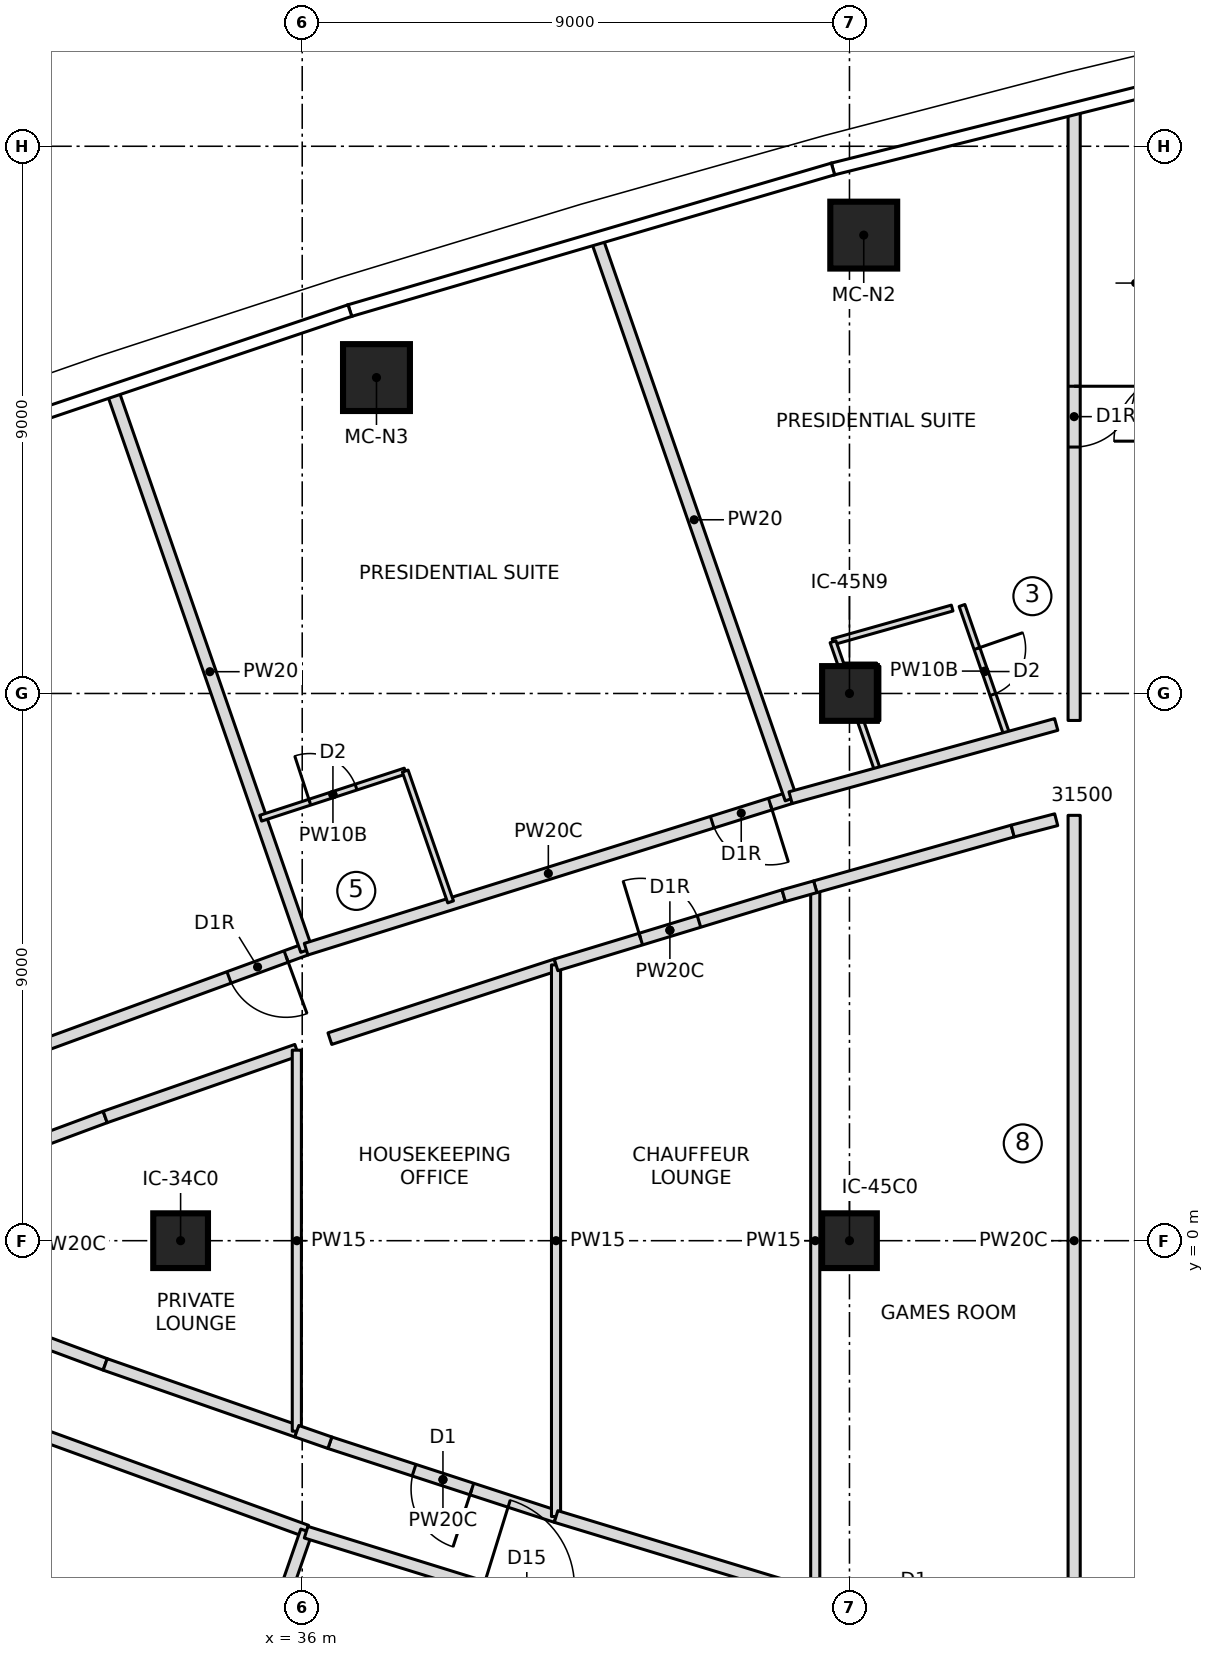
"""IFC4 building model, lengths in metres.
Left out: names, types, materials, properties, quantities, classifications, styles, units other than length and angle.
Written with IfcOpenShell. Run it as: python <this file> out.ifc"""

import sys

from ifc_helpers import new_model, si_unit, direction, frame, frame_2d, origin, origin_2d, place, context, subcontext, project, spatial, rectangle, extrude, element, fill, save


model = new_model("IFC4")
c1 = context("Model", 3, precision=1e-05, world=origin(), true_north=direction((0.0, 1.0)))
c2 = subcontext(c1, "Body", "Model", "MODEL_VIEW")
j1 = project(units=[si_unit("LENGTHUNIT", "METRE"), si_unit("PLANEANGLEUNIT", "RADIAN")], contexts=[c1])
p1 = place(None, origin())
s1 = spatial("IfcSite", under=j1, at=p1, CompositionType="ELEMENT")
p2 = place(p1, origin())
s2 = spatial("IfcBuilding", under=s1, at=p2, CompositionType="ELEMENT")
p3 = place(p2, frame((0.0, 0.0, 292.75)))
s3 = spatial("IfcBuildingStorey", under=s2, at=p3, CompositionType="ELEMENT", Elevation=292.75)
for number, where, z_axis, x_axis in (
    (1, (45.235, 16.539, 0.0), (0.0, 0.0, 1.0), (1.0, 0.0, 0.0)),
    (2, (37.221, 14.196, 0.0), (0.0, 0.0, 1.0), (1.0, 0.0, 0.0)),
):
    element("IfcColumn", number, at=place(p3, frame(where, z_axis=z_axis, x_axis=x_axis)), inside=s3, PredefinedType="COLUMN", context=c2, shape_type="SweptSolid", body=[
        extrude(rectangle(XDim=1.1, YDim=1.1, at=origin_2d()), origin(), (0.0, 0.0, 1.0), 3.55),
    ])
for number, where, z_axis, x_axis in (
    (3, (34.0, 0.0, 0.0), (0.0, 0.0, 1.0), (1.0, 0.0, 0.0)),
    (4, (45.0, 0.0, 0.0), (0.0, 0.0, 1.0), (1.0, 0.0, 0.0)),
    (5, (45.0, 9.0, 0.0), (0.0, 0.0, 1.0), (1.0, 0.0, 0.0)),
):
    element("IfcColumn", number, at=place(p3, frame(where, z_axis=z_axis, x_axis=x_axis)), inside=s3, PredefinedType="COLUMN", context=c2, shape_type="SweptSolid", body=[
        extrude(rectangle(XDim=0.9, YDim=0.9, at=origin_2d()), origin(), (0.0, 0.0, 1.0), 3.55),
    ])
p4 = place(p3, frame((36.064, 4.794, 0.0), z_axis=(0.0, 0.0, 1.0), x_axis=(-0.93911227702, -0.34361043516, 0.0)))
e6 = element("IfcWall", 6, at=p4, inside=s3, PredefinedType="PARTITIONING", context=c2, shape_type="SweptSolid", body=[
    extrude(rectangle(XDim=9.812, YDim=0.2, at=frame_2d((4.906, 0.0))), origin(), (0.0, 0.0, 1.0), 3.25),
])
p5 = place(p4, frame((0.35, 0.0, 0.0)))
e7 = element("IfcOpeningElement", 7, at=p5, cuts=e6, PredefinedType="OPENING", context=c2, shape_type="SweptSolid", body=[
    extrude(rectangle(XDim=1.0, YDim=2.1, at=frame_2d((0.5, 1.05))), frame((0.0, 0.11, 0.0), z_axis=(0.0, -1.0, 0.0), x_axis=(1.0, 0.0, 0.0)), (0.0, 0.0, 1.0), 0.22),
])
p6 = place(p3, frame((36.071, 4.775, 0.0), z_axis=(0.0, 0.0, 1.0), x_axis=(-0.327725028322, 0.94477315045, 0.0)))
e8 = element("IfcWall", 8, at=p6, inside=s3, PredefinedType="PARTITIONING", context=c2, shape_type="SweptSolid", body=[
    extrude(rectangle(XDim=9.702, YDim=0.2, at=frame_2d((4.851, 0.0))), origin(), (0.0, 0.0, 1.0), 3.25),
])
p7 = place(p3, frame((44.031, 7.286, 0.0), z_axis=(0.0, 0.0, 1.0), x_axis=(-0.95441177989, -0.29849313963, 0.0)))
e9 = element("IfcWall", 9, at=p7, inside=s3, PredefinedType="PARTITIONING", context=c2, shape_type="SweptSolid", body=[
    extrude(rectangle(XDim=8.348, YDim=0.2, at=frame_2d((4.174, 0.0))), origin(), (0.0, 0.0, 1.0), 3.25),
])
p8 = place(p7, frame((0.35, 0.0, 0.0)))
e10 = element("IfcOpeningElement", 10, at=p8, cuts=e9, PredefinedType="OPENING", context=c2, shape_type="SweptSolid", body=[
    extrude(rectangle(XDim=1.0, YDim=2.1, at=frame_2d((0.5, 1.05))), frame((0.0, 0.11, 0.0), z_axis=(0.0, -1.0, 0.0), x_axis=(1.0, 0.0, 0.0)), (0.0, 0.0, 1.0), 0.22),
])
p9 = place(p3, frame((35.317, 6.948, 0.0), z_axis=(0.0, 0.0, 1.0), x_axis=(0.950666002187, 0.310216299194, 0.0)))
e11 = element("IfcWall", 11, at=p9, inside=s3, PredefinedType="PARTITIONING", context=c2, shape_type="SweptSolid", body=[
    extrude(rectangle(XDim=2.5, YDim=0.1, at=frame_2d((1.25, 0.0))), origin(), (0.0, 0.0, 1.0), 3.25),
])
p10 = place(p9, frame((0.85, 0.0, 0.0)))
e12 = element("IfcOpeningElement", 12, at=p10, cuts=e11, PredefinedType="OPENING", context=c2, shape_type="SweptSolid", body=[
    extrude(rectangle(XDim=0.8, YDim=2.1, at=frame_2d((0.4, 1.05))), frame((0.0, 0.06, 0.0), z_axis=(0.0, -1.0, 0.0), x_axis=(1.0, 0.0, 0.0)), (0.0, 0.0, 1.0), 0.12),
])
p11 = place(p3, frame((37.694, 7.724, 0.0), z_axis=(0.0, 0.0, 1.0), x_axis=(0.327622330203, -0.944808768351, 0.0)))
e13 = element("IfcWall", 13, at=p11, inside=s3, PredefinedType="PARTITIONING", context=c2, shape_type="SweptSolid", body=[
    extrude(rectangle(XDim=2.277, YDim=0.1, at=frame_2d((1.139, 0.0))), origin(), (0.0, 0.0, 1.0), 3.25),
])
p12 = place(p3, frame((44.038, 7.267, 0.0), z_axis=(0.0, 0.0, 1.0), x_axis=(-0.327714576096, 0.944776776077, 0.0)))
e14 = element("IfcWall", 14, at=p12, inside=s3, PredefinedType="PARTITIONING", context=c2, shape_type="SweptSolid", body=[
    extrude(rectangle(XDim=9.717, YDim=0.2, at=frame_2d((4.858, 0.0))), origin(), (0.0, 0.0, 1.0), 3.25),
])
p13 = place(p3, frame((44.729, 9.852, 0.0), z_axis=(0.0, 0.0, 1.0), x_axis=(0.962405498185, 0.271616746654, 0.0)))
e15 = element("IfcWall", 15, at=p13, inside=s3, PredefinedType="PARTITIONING", context=c2, shape_type="SweptSolid", body=[
    extrude(rectangle(XDim=2.037, YDim=0.1, at=frame_2d((1.019, 0.0))), origin(), (0.0, 0.0, 1.0), 3.25),
])
p14 = place(p3, frame((46.851, 10.447, 0.0), z_axis=(0.0, 0.0, 1.0), x_axis=(0.327716238033, -0.944776199599, 0.0)))
e16 = element("IfcWall", 16, at=p14, inside=s3, PredefinedType="PARTITIONING", context=c2, shape_type="SweptSolid", body=[
    extrude(rectangle(XDim=2.284, YDim=0.1, at=frame_2d((1.142, 0.0))), origin(), (0.0, 0.0, 1.0), 3.25),
])
p15 = place(p14, frame((0.75, 0.0, 0.0)))
e17 = element("IfcOpeningElement", 17, at=p15, cuts=e16, PredefinedType="OPENING", context=c2, shape_type="SweptSolid", body=[
    extrude(rectangle(XDim=0.8, YDim=2.1, at=frame_2d((0.4, 1.05))), frame((0.0, 0.06, 0.0), z_axis=(0.0, -1.0, 0.0), x_axis=(1.0, 0.0, 0.0)), (0.0, 0.0, 1.0), 0.12),
])
p16 = place(p3, frame((45.476, 7.697, 0.0), z_axis=(0.0, 0.0, 1.0), x_axis=(-0.327723446833, 0.944773699039, 0.0)))
e18 = element("IfcWall", 18, at=p16, inside=s3, PredefinedType="PARTITIONING", context=c2, shape_type="SweptSolid", body=[
    extrude(rectangle(XDim=0.903, YDim=0.1, at=frame_2d((0.451, 0.0))), origin(), (0.0, 0.0, 1.0), 3.25),
])
p17 = place(p3, frame((45.45, 8.552, 0.0), z_axis=(0.0, 0.0, 1.0), x_axis=(0.0, 1.0, 0.0)))
e19 = element("IfcWall", 19, at=p17, inside=s3, PredefinedType="PARTITIONING", context=c2, shape_type="SweptSolid", body=[
    extrude(rectangle(XDim=0.896, YDim=0.1, at=frame_2d((0.448, 0.0))), origin(), (0.0, 0.0, 1.0), 3.25),
])
p18 = place(p3, frame((45.448, 9.45, 0.0), z_axis=(0.0, 0.0, 1.0), x_axis=(-1.0, 0.0, 0.0)))
e20 = element("IfcWall", 20, at=p18, inside=s3, PredefinedType="PARTITIONING", context=c2, shape_type="SweptSolid", body=[
    extrude(rectangle(XDim=0.58, YDim=0.1, at=frame_2d((0.29, 0.0))), origin(), (0.0, 0.0, 1.0), 3.25),
])
p19 = place(p3, frame((44.868, 9.45, 0.0), z_axis=(0.0, 0.0, 1.0), x_axis=(-0.327741335839, 0.944767493504, 0.0)))
e21 = element("IfcWall", 21, at=p19, inside=s3, PredefinedType="PARTITIONING", context=c2, shape_type="SweptSolid", body=[
    extrude(rectangle(XDim=0.425, YDim=0.1, at=frame_2d((0.213, 0.0))), origin(), (0.0, 0.0, 1.0), 3.25),
])
p20 = place(p3, frame((26.85, -1.423, 0.0), z_axis=(0.0, 0.0, 1.0), x_axis=(0.939807953272, -0.341703103536, 0.0)))
e22 = element("IfcWall", 22, at=p20, inside=s3, PredefinedType="PARTITIONING", context=c2, shape_type="SweptSolid", body=[
    extrude(rectangle(XDim=9.811, YDim=0.2, at=frame_2d((4.906, 0.0))), origin(), (0.0, 0.0, 1.0), 3.25),
])
p21 = place(p20, frame((3.05, 0.0, 0.0)))
e23 = element("IfcOpeningElement", 23, at=p21, cuts=e22, PredefinedType="OPENING", context=c2, shape_type="SweptSolid", body=[
    extrude(rectangle(XDim=1.5, YDim=2.1, at=frame_2d((0.75, 1.05))), frame((0.0, 0.11, 0.0), z_axis=(0.0, -1.0, 0.0), x_axis=(1.0, 0.0, 0.0)), (0.0, 0.0, 1.0), 0.22),
])
p22 = place(p3, frame((32.891, -13.941, 0.0), z_axis=(0.0, 0.0, 1.0), x_axis=(0.327725028322, 0.94477315045, 0.0)))
e24 = element("IfcWall", 24, at=p22, inside=s3, PredefinedType="PARTITIONING", context=c2, shape_type="SweptSolid", body=[
    extrude(rectangle(XDim=9.702, YDim=0.2, at=frame_2d((4.851, 0.0))), origin(), (0.0, 0.0, 1.0), 3.25),
])
p23 = place(p3, frame((36.064, -4.794, 0.0), z_axis=(0.0, 0.0, 1.0), x_axis=(0.955129200503, -0.296189483855, 0.0)))
e25 = element("IfcWall", 25, at=p23, inside=s3, PredefinedType="PARTITIONING", context=c2, shape_type="SweptSolid", body=[
    extrude(rectangle(XDim=8.348, YDim=0.2, at=frame_2d((4.174, 0.0))), origin(), (0.0, 0.0, 1.0), 3.25),
])
p24 = place(p23, frame((3.05, 0.0, 0.0)))
e26 = element("IfcOpeningElement", 26, at=p24, cuts=e25, PredefinedType="OPENING", context=c2, shape_type="SweptSolid", body=[
    extrude(rectangle(XDim=1.5, YDim=2.1, at=frame_2d((0.75, 1.05))), frame((0.0, 0.11, 0.0), z_axis=(0.0, -1.0, 0.0), x_axis=(1.0, 0.0, 0.0)), (0.0, 0.0, 1.0), 0.22),
])
p25 = place(p3, frame((32.76, -2.035, 0.0), z_axis=(0.0, 0.0, 1.0), x_axis=(-0.937460178932, 0.348092534992, 0.0)))
e27 = element("IfcWall", 27, at=p25, inside=s3, PredefinedType="PARTITIONING", context=c2, shape_type="SweptSolid", body=[
    extrude(rectangle(XDim=3.913, YDim=0.2, at=frame_2d((1.957, 0.0))), origin(), (0.0, 0.0, 1.0), 3.25),
])
p26 = place(p25, frame((1.457, 0.0, 0.0)))
e28 = element("IfcOpeningElement", 28, at=p26, cuts=e27, PredefinedType="OPENING", context=c2, shape_type="SweptSolid", body=[
    extrude(rectangle(XDim=1.0, YDim=2.1, at=frame_2d((0.5, 1.05))), frame((0.0, 0.11, 0.0), z_axis=(0.0, -1.0, 0.0), x_axis=(1.0, 0.0, 0.0)), (0.0, 0.0, 1.0), 0.22),
])
p27 = place(p3, frame((29.092, 0.673, 0.0), z_axis=(0.0, 0.0, 1.0), x_axis=(0.937460178932, 0.348092534992, 0.0)))
e29 = element("IfcWall", 29, at=p27, inside=s3, PredefinedType="PARTITIONING", context=c2, shape_type="SweptSolid", body=[
    extrude(rectangle(XDim=3.913, YDim=0.2, at=frame_2d((1.957, 0.0))), origin(), (0.0, 0.0, 1.0), 3.25),
])
for number, where, z_axis, x_axis in (
    (30, (32.76, 2.035, 0.0), (0.0, 0.0, 1.0), (0.944, 0.329, 0.0)),
    (31, (35.911, -3.133, 0.0), (0.0, 0.0, 1.0), (-0.944, 0.329, 0.0)),
):
    element("IfcWall", number, at=place(p3, frame(where, z_axis=z_axis, x_axis=x_axis)), inside=s3, PredefinedType="PARTITIONING", context=c2, shape_type="SweptSolid", body=[
        extrude(rectangle(XDim=3.338, YDim=0.2, at=frame_2d((1.669, 0.0))), origin(), (0.0, 0.0, 1.0), 3.25),
    ])
p28 = place(p3, frame((35.911, -3.133, 0.0), z_axis=(0.0, 0.0, 1.0), x_axis=(0.0, 1.0, 0.0)))
e32 = element("IfcWall", 32, at=p28, inside=s3, PredefinedType="PARTITIONING", context=c2, shape_type="SweptSolid", body=[
    extrude(rectangle(XDim=6.267, YDim=0.15, at=frame_2d((3.133, 0.0))), origin(), (0.0, 0.0, 1.0), 3.25),
])
p29 = place(p3, frame((40.174, -4.536, 0.0), z_axis=(0.0, 0.0, 1.0), x_axis=(-0.950716244522, 0.310062287938, 0.0)))
e33 = element("IfcWall", 33, at=p29, inside=s3, PredefinedType="PARTITIONING", context=c2, shape_type="SweptSolid", body=[
    extrude(rectangle(XDim=3.913, YDim=0.2, at=frame_2d((1.956, 0.0))), origin(), (0.0, 0.0, 1.0), 3.25),
])
p30 = place(p29, frame((1.456, 0.0, 0.0)))
e34 = element("IfcOpeningElement", 34, at=p30, cuts=e33, PredefinedType="OPENING", context=c2, shape_type="SweptSolid", body=[
    extrude(rectangle(XDim=1.0, YDim=2.1, at=frame_2d((0.5, 1.05))), frame((0.0, 0.11, 0.0), z_axis=(0.0, -1.0, 0.0), x_axis=(1.0, 0.0, 0.0)), (0.0, 0.0, 1.0), 0.22),
])
p31 = place(p3, frame((36.455, 3.323, 0.0), z_axis=(0.0, 0.0, 1.0), x_axis=(0.950716244522, 0.310062287938, 0.0)))
e35 = element("IfcWall", 35, at=p31, inside=s3, PredefinedType="PARTITIONING", context=c2, shape_type="SweptSolid", body=[
    extrude(rectangle(XDim=3.913, YDim=0.2, at=frame_2d((1.956, 0.0))), origin(), (0.0, 0.0, 1.0), 3.25),
])
p32 = place(p3, frame((40.174, -4.536, 0.0), z_axis=(0.0, 0.0, 1.0), x_axis=(0.0, 1.0, 0.0)))
e36 = element("IfcWall", 36, at=p32, inside=s3, PredefinedType="PARTITIONING", context=c2, shape_type="SweptSolid", body=[
    extrude(rectangle(XDim=9.072, YDim=0.15, at=frame_2d((4.536, 0.0))), origin(), (0.0, 0.0, 1.0), 3.25),
])
p33 = place(p3, frame((40.175, 4.536, 0.0), z_axis=(0.0, 0.0, 1.0), x_axis=(0.956723737069, 0.29099775073, 0.0)))
e37 = element("IfcWall", 37, at=p33, inside=s3, PredefinedType="PARTITIONING", context=c2, shape_type="SweptSolid", body=[
    extrude(rectangle(XDim=3.913, YDim=0.2, at=frame_2d((1.957, 0.0))), origin(), (0.0, 0.0, 1.0), 3.25),
])
p34 = place(p33, frame((1.457, 0.0, 0.0)))
e38 = element("IfcOpeningElement", 38, at=p34, cuts=e37, PredefinedType="OPENING", context=c2, shape_type="SweptSolid", body=[
    extrude(rectangle(XDim=1.0, YDim=2.1, at=frame_2d((0.5, 1.05))), frame((0.0, 0.11, 0.0), z_axis=(0.0, -1.0, 0.0), x_axis=(1.0, 0.0, 0.0)), (0.0, 0.0, 1.0), 0.22),
])
p35 = place(p3, frame((43.918, -5.675, 0.0), z_axis=(0.0, 0.0, 1.0), x_axis=(-0.956723737069, 0.29099775073, 0.0)))
e39 = element("IfcWall", 39, at=p35, inside=s3, PredefinedType="PARTITIONING", context=c2, shape_type="SweptSolid", body=[
    extrude(rectangle(XDim=3.913, YDim=0.2, at=frame_2d((1.957, 0.0))), origin(), (0.0, 0.0, 1.0), 3.25),
])
p36 = place(p3, frame((44.437, -5.821, 0.0), z_axis=(0.0, 0.0, 1.0), x_axis=(0.0, 1.0, 0.0)))
e40 = element("IfcWall", 40, at=p36, inside=s3, PredefinedType="PARTITIONING", context=c2, shape_type="SweptSolid", body=[
    extrude(rectangle(XDim=11.642, YDim=0.15, at=frame_2d((5.821, 0.0))), origin(), (0.0, 0.0, 1.0), 3.25),
])
p37 = place(p3, frame((44.437, 5.821, 0.0), z_axis=(0.0, 0.0, 1.0), x_axis=(0.962403613575, 0.271623424206, 0.0)))
e41 = element("IfcWall", 41, at=p37, inside=s3, PredefinedType="PARTITIONING", context=c2, shape_type="SweptSolid", body=[
    extrude(rectangle(XDim=3.374, YDim=0.2, at=frame_2d((1.687, 0.0))), origin(), (0.0, 0.0, 1.0), 3.25),
])
p38 = place(p3, frame((48.4, 8.49, 0.0), z_axis=(0.0, 0.0, 1.0), x_axis=(-0.964024043021, -0.265815056905, 0.0)))
e42 = element("IfcWall", 42, at=p38, inside=s3, PredefinedType="PARTITIONING", context=c2, shape_type="SweptSolid", body=[
    extrude(rectangle(XDim=4.532, YDim=0.2, at=frame_2d((2.266, 0.0))), origin(), (0.0, 0.0, 1.0), 3.25),
])
p39 = place(p3, frame((47.684, 6.738, 0.0), z_axis=(0.0, 0.0, 1.0), x_axis=(0.967585713416, 0.252542842294, 0.0)))
e43 = element("IfcWall", 43, at=p39, inside=s3, PredefinedType="PARTITIONING", context=c2, shape_type="SweptSolid", body=[
    extrude(rectangle(XDim=0.74, YDim=0.2, at=frame_2d((0.37, 0.0))), origin(), (0.0, 0.0, 1.0), 3.25),
])
p40 = place(p3, frame((48.695, 6.996, 0.0), z_axis=(0.0, 0.0, 1.0), x_axis=(0.0, -1.0, 0.0)))
e44 = element("IfcWall", 44, at=p40, inside=s3, PredefinedType="PARTITIONING", context=c2, shape_type="SweptSolid", body=[
    extrude(rectangle(XDim=13.992, YDim=0.2, at=frame_2d((6.996, 0.0))), origin(), (0.0, 0.0, 1.0), 3.25),
])
p41 = place(p3, frame((48.695, 18.553, 0.0), z_axis=(0.0, 0.0, 1.0), x_axis=(0.0, -1.0, 0.0)))
e45 = element("IfcWall", 45, at=p41, inside=s3, PredefinedType="PARTITIONING", context=c2, shape_type="SweptSolid", body=[
    extrude(rectangle(XDim=9.997, YDim=0.2, at=frame_2d((4.998, 0.0))), origin(), (0.0, 0.0, 1.0), 3.25),
])
p42 = place(p41, frame((4.5, 0.0, 0.0)))
e46 = element("IfcOpeningElement", 46, at=p42, cuts=e45, PredefinedType="OPENING", context=c2, shape_type="SweptSolid", body=[
    extrude(rectangle(XDim=1.0, YDim=2.1, at=frame_2d((0.5, 1.05))), frame((0.0, 0.11, 0.0), z_axis=(0.0, -1.0, 0.0), x_axis=(1.0, 0.0, 0.0)), (0.0, 0.0, 1.0), 0.22),
])
p43 = place(p3, frame((36.455, -3.323, 0.0), z_axis=(0.0, 0.0, 1.0), x_axis=(-0.9442216639, 0.329310566825, 0.0)))
e47 = element("IfcWall", 47, at=p43, inside=s3, PredefinedType="PARTITIONING", context=c2, shape_type="SweptSolid", body=[
    extrude(rectangle(XDim=0.575, YDim=0.2, at=frame_2d((0.288, 0.0))), origin(), (0.0, 0.0, 1.0), 3.25),
])
p44 = place(p3, frame((43.918, 5.675, 0.0), z_axis=(0.0, 0.0, 1.0), x_axis=(0.9624587823, 0.271427876929, 0.0)))
e48 = element("IfcWall", 48, at=p44, inside=s3, PredefinedType="PARTITIONING", context=c2, shape_type="SweptSolid", body=[
    extrude(rectangle(XDim=0.539, YDim=0.2, at=frame_2d((0.27, 0.0))), origin(), (0.0, 0.0, 1.0), 3.25),
])
p45 = place(p5, origin())
e49 = element("IfcDoor", 49, at=p45, inside=s3, OperationType="SINGLE_SWING_RIGHT", PredefinedType="DOOR", context=c2, shape_type="SweptSolid", body=[
    extrude(rectangle(XDim=1.0, YDim=2.1, at=frame_2d((0.5, 1.05))), frame((0.0, 0.025, 0.0), z_axis=(0.0, -1.0, 0.0), x_axis=(1.0, 0.0, 0.0)), (0.0, 0.0, 1.0), 0.05),
])
fill(e7, e49)
p46 = place(p10, origin())
e50 = element("IfcDoor", 50, at=p46, inside=s3, OperationType="SINGLE_SWING_LEFT", PredefinedType="DOOR", context=c2, shape_type="SweptSolid", body=[
    extrude(rectangle(XDim=0.8, YDim=2.1, at=frame_2d((0.4, 1.05))), frame((0.0, 0.025, 0.0), z_axis=(0.0, -1.0, 0.0), x_axis=(1.0, 0.0, 0.0)), (0.0, 0.0, 1.0), 0.05),
])
fill(e12, e50)
p47 = place(p8, origin())
e51 = element("IfcDoor", 51, at=p47, inside=s3, OperationType="SINGLE_SWING_RIGHT", PredefinedType="DOOR", context=c2, shape_type="SweptSolid", body=[
    extrude(rectangle(XDim=1.0, YDim=2.1, at=frame_2d((0.5, 1.05))), frame((0.0, 0.025, 0.0), z_axis=(0.0, -1.0, 0.0), x_axis=(1.0, 0.0, 0.0)), (0.0, 0.0, 1.0), 0.05),
])
fill(e10, e51)
p48 = place(p15, origin())
e52 = element("IfcDoor", 52, at=p48, inside=s3, OperationType="SINGLE_SWING_LEFT", PredefinedType="DOOR", context=c2, shape_type="SweptSolid", body=[
    extrude(rectangle(XDim=0.8, YDim=2.1, at=frame_2d((0.4, 1.05))), frame((0.0, 0.025, 0.0), z_axis=(0.0, -1.0, 0.0), x_axis=(1.0, 0.0, 0.0)), (0.0, 0.0, 1.0), 0.05),
])
fill(e17, e52)
p49 = place(p30, origin())
e53 = element("IfcDoor", 53, at=p49, inside=s3, OperationType="SINGLE_SWING_LEFT", PredefinedType="DOOR", context=c2, shape_type="SweptSolid", body=[
    extrude(rectangle(XDim=1.0, YDim=2.1, at=frame_2d((0.5, 1.05))), frame((0.0, 0.025, 0.0), z_axis=(0.0, -1.0, 0.0), x_axis=(1.0, 0.0, 0.0)), (0.0, 0.0, 1.0), 0.05),
])
fill(e34, e53)
p50 = place(p34, origin())
e54 = element("IfcDoor", 54, at=p50, inside=s3, OperationType="SINGLE_SWING_RIGHT", PredefinedType="DOOR", context=c2, shape_type="SweptSolid", body=[
    extrude(rectangle(XDim=1.0, YDim=2.1, at=frame_2d((0.5, 1.05))), frame((0.0, 0.025, 0.0), z_axis=(0.0, -1.0, 0.0), x_axis=(1.0, 0.0, 0.0)), (0.0, 0.0, 1.0), 0.05),
])
fill(e38, e54)
p51 = place(p42, origin())
e55 = element("IfcDoor", 55, at=p51, inside=s3, OperationType="SINGLE_SWING_RIGHT", PredefinedType="DOOR", context=c2, shape_type="SweptSolid", body=[
    extrude(rectangle(XDim=1.0, YDim=2.1, at=frame_2d((0.5, 1.05))), frame((0.0, 0.025, 0.0), z_axis=(0.0, -1.0, 0.0), x_axis=(1.0, 0.0, 0.0)), (0.0, 0.0, 1.0), 0.05),
])
fill(e46, e55)
save(model, sys.argv[1])
